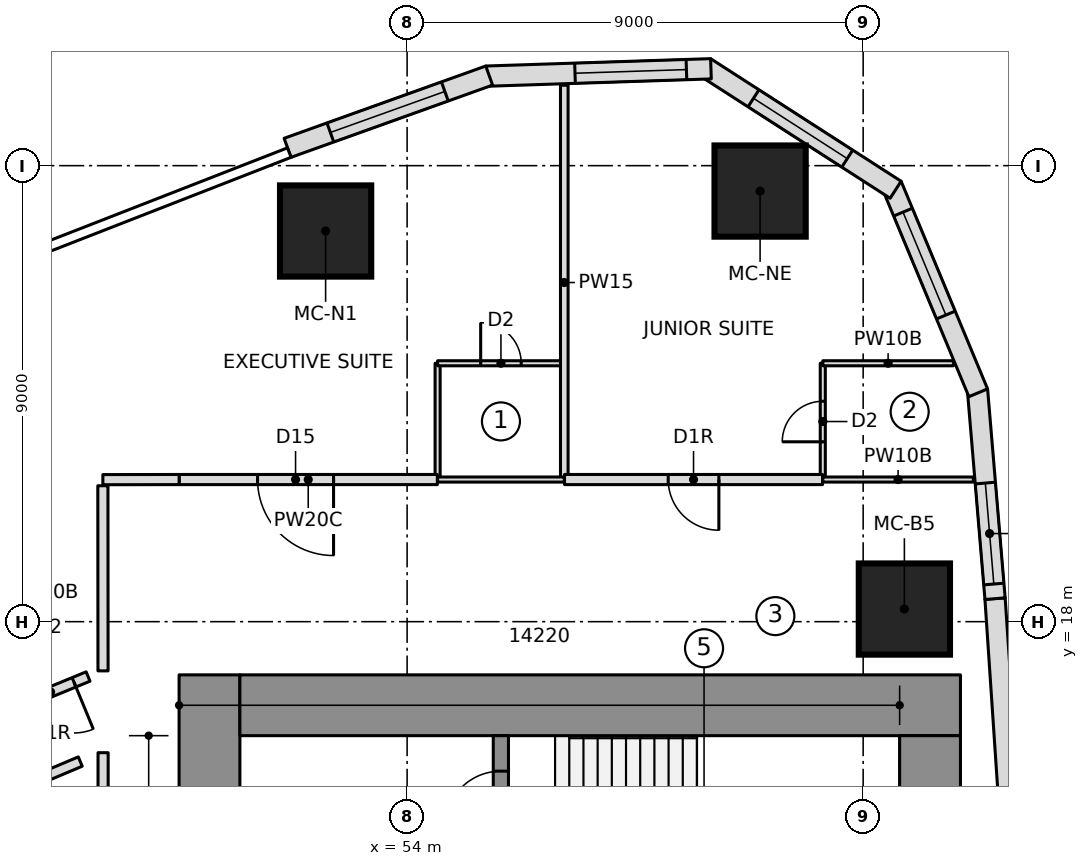
"""IFC4 building model, lengths in metres.
Left out: names, types, materials, properties, quantities, classifications, styles, units other than length and angle.
Written with IfcOpenShell. Run it as: python <this file> out.ifc"""

import sys

from ifc_helpers import new_model, si_unit, direction, frame, frame_2d, origin, origin_2d, place, context, subcontext, project, spatial, polyline, rectangle, outline, extrude, element, fill, save


model = new_model("IFC4")
c1 = context("Model", 3, precision=1e-05, world=origin(), true_north=direction((0.0, 1.0)))
c2 = subcontext(c1, "Body", "Model", "MODEL_VIEW")
j1 = project(units=[si_unit("LENGTHUNIT", "METRE"), si_unit("PLANEANGLEUNIT", "RADIAN")], contexts=[c1])
p1 = place(None, origin())
s1 = spatial("IfcSite", under=j1, at=p1, CompositionType="ELEMENT")
p2 = place(p1, origin())
s2 = spatial("IfcBuilding", under=s1, at=p2, CompositionType="ELEMENT")
p3 = place(p2, frame((0.0, 0.0, 64.45)))
s3 = spatial("IfcBuildingStorey", under=s2, at=p3, CompositionType="ELEMENT", Elevation=64.45)
p4 = place(p3, frame((50.1, 6.65, 0.0), z_axis=(0.0, 0.0, 1.0), x_axis=(0.0, 1.0, 0.0)))
e1 = element("IfcWall", 1, at=p4, inside=s3, PredefinedType="SHEAR", context=c2, shape_type="SweptSolid", body=[
    extrude(rectangle(XDim=10.3, YDim=1.2, at=frame_2d((5.15, 0.0))), origin(), (0.0, 0.0, 1.0), 3.55),
])
p5 = place(p4, frame((6.5, 0.0, 0.0)))
e2 = element("IfcOpeningElement", 2, at=p5, cuts=e1, PredefinedType="OPENING", context=c2, shape_type="SweptSolid", body=[
    extrude(rectangle(XDim=1.1, YDim=2.1, at=frame_2d((0.55, 1.05))), frame((0.0, 0.61, 0.0), z_axis=(0.0, -1.0, 0.0), x_axis=(1.0, 0.0, 0.0)), (0.0, 0.0, 1.0), 1.22),
])
p6 = place(p3, frame((50.7, 16.35, 0.0), z_axis=(0.0, 0.0, 1.0), x_axis=(1.0, 0.0, 0.0)))
e3 = element("IfcWall", 3, at=p6, inside=s3, PredefinedType="SHEAR", context=c2, shape_type="SweptSolid", body=[
    extrude(rectangle(XDim=14.22, YDim=1.2, at=frame_2d((7.11, 0.0))), origin(), (0.0, 0.0, 1.0), 3.55),
])
p7 = place(p3, frame((64.32, 9.95, 0.0), z_axis=(0.0, 0.0, 1.0), x_axis=(0.0, 1.0, 0.0)))
e4 = element("IfcWall", 4, at=p7, inside=s3, PredefinedType="SHEAR", context=c2, shape_type="SweptSolid", body=[
    extrude(rectangle(XDim=5.8, YDim=1.2, at=frame_2d((2.9, 0.0))), origin(), (0.0, 0.0, 1.0), 3.55),
])
p8 = place(p3, frame((55.85, 10.35, 0.0), z_axis=(0.0, 0.0, 1.0), x_axis=(0.0, 1.0, 0.0)))
e5 = element("IfcWall", 5, at=p8, inside=s3, PredefinedType="SHEAR", context=c2, shape_type="SweptSolid", body=[
    extrude(rectangle(XDim=5.4, YDim=0.3, at=frame_2d((2.7, 0.0))), origin(), (0.0, 0.0, 1.0), 3.55),
])
p9 = place(p8, frame((1.43, 0.0, 0.0)))
e6 = element("IfcOpeningElement", 6, at=p9, cuts=e5, PredefinedType="OPENING", context=c2, shape_type="SweptSolid", body=[
    extrude(rectangle(XDim=1.1, YDim=2.1, at=frame_2d((0.55, 1.05))), frame((0.0, 0.16, 0.0), z_axis=(0.0, -1.0, 0.0), x_axis=(1.0, 0.0, 0.0)), (0.0, 0.0, 1.0), 0.32),
])
p10 = place(p8, frame((3.6, 0.0, 0.0)))
e7 = element("IfcOpeningElement", 7, at=p10, cuts=e5, PredefinedType="OPENING", context=c2, shape_type="SweptSolid", body=[
    extrude(rectangle(XDim=1.1, YDim=2.1, at=frame_2d((0.55, 1.05))), frame((0.0, 0.16, 0.0), z_axis=(0.0, -1.0, 0.0), x_axis=(1.0, 0.0, 0.0)), (0.0, 0.0, 1.0), 0.32),
])
for number, where, z_axis, x_axis in (
    (8, (63.813, 18.249, 0.0), (0.0, 0.0, 1.0), (1.0, 0.0, 0.0)),
    (9, (60.966, 26.499, 0.0), (0.0, 0.0, 1.0), (1.0, 0.0, 0.0)),
    (10, (52.392, 25.71, 0.0), (0.0, 0.0, 1.0), (1.0, 0.0, 0.0)),
):
    element("IfcColumn", number, at=place(p3, frame(where, z_axis=z_axis, x_axis=x_axis)), inside=s3, PredefinedType="COLUMN", context=c2, shape_type="SweptSolid", body=[
        extrude(rectangle(XDim=1.8, YDim=1.8, at=origin_2d()), origin(), (0.0, 0.0, 1.0), 3.55),
    ])
p11 = place(p3, frame((65.878, 14.36, 0.0), z_axis=(0.0, 0.0, 1.0), x_axis=(-0.067087430225, 0.997747100575, 0.0)))
e11 = element("IfcWall", 11, at=p11, inside=s3, PredefinedType="NOTDEFINED", context=c2, shape_type="SweptSolid", body=[
    extrude(outline(polyline([(-0.002, -0.2), (4.107, -0.2), (4.103, 0.2), (0.002, 0.2), (-0.002, -0.2)])), origin(), (0.0, 0.0, 1.0), 3.25),
])
p12 = place(p3, frame((65.603, 18.455, 0.0), z_axis=(0.0, 0.0, 1.0), x_axis=(-0.083793550906, 0.996483136248, 0.0)))
e12 = element("IfcWall", 12, at=p12, inside=s3, PredefinedType="NOTDEFINED", context=c2, shape_type="SweptSolid", body=[
    extrude(outline(polyline([(-0.002, -0.2), (4.136, -0.2), (4.074, 0.2), (0.002, 0.2), (-0.002, -0.2)])), origin(), (0.0, 0.0, 1.0), 3.25),
])
p13 = place(p12, frame((0.288, 0.0, 0.5)))
e13 = element("IfcOpeningElement", 13, at=p13, cuts=e12, PredefinedType="OPENING", context=c2, shape_type="SweptSolid", body=[
    extrude(rectangle(XDim=2.0, YDim=2.0, at=frame_2d((1.0, 1.0))), frame((0.0, 0.21, 0.0), z_axis=(0.0, -1.0, 0.0), x_axis=(1.0, 0.0, 0.0)), (0.0, 0.0, 1.0), 0.42),
])
p14 = place(p3, frame((65.259, 22.546, 0.0), z_axis=(0.0, 0.0, 1.0), x_axis=(-0.384372042685, 0.923178277908, 0.0)))
e14 = element("IfcWall", 14, at=p14, inside=s3, PredefinedType="NOTDEFINED", context=c2, shape_type="SweptSolid", body=[
    extrude(outline(polyline([(-0.031, -0.2), (4.408, -0.2), (4.283, 0.2), (0.031, 0.2), (-0.031, -0.2)])), origin(), (0.0, 0.0, 1.0), 3.25),
])
p15 = place(p14, frame((1.631, 0.0, 0.6)))
e15 = element("IfcOpeningElement", 15, at=p15, cuts=e14, PredefinedType="OPENING", context=c2, shape_type="SweptSolid", body=[
    extrude(outline(polyline([(0.0, 1.35), (0.084, 1.771), (0.322, 2.128), (0.679, 2.366), (1.1, 2.45), (1.521, 2.366), (1.878, 2.128), (2.116, 1.771), (2.2, 1.35), (2.2, 1.1), (2.116, 0.679), (1.878, 0.322), (1.521, 0.084), (1.1, 0.0), (0.679, 0.084), (0.322, 0.322), (0.084, 0.679), (0.0, 1.1), (0.0, 1.35)])), frame((0.0, 0.21, 0.0), z_axis=(0.0, -1.0, 0.0), x_axis=(1.0, 0.0, 0.0)), (0.0, 0.0, 1.0), 0.42),
])
p16 = place(p3, frame((63.588, 26.558, 0.0), z_axis=(0.0, 0.0, 1.0), x_axis=(-0.840937468718, 0.541132307025, 0.0)))
e16 = element("IfcWall", 16, at=p16, inside=s3, PredefinedType="NOTDEFINED", context=c2, shape_type="SweptSolid", body=[
    extrude(outline(polyline([(-0.062, -0.2), (4.409, -0.2), (4.284, 0.2), (0.062, 0.2), (-0.062, -0.2)])), origin(), (0.0, 0.0, 1.0), 3.25),
])
p17 = place(p16, frame((1.073, 0.0, 0.6)))
e17 = element("IfcOpeningElement", 17, at=p17, cuts=e16, PredefinedType="OPENING", context=c2, shape_type="SweptSolid", body=[
    extrude(outline(polyline([(0.0, 1.35), (0.084, 1.771), (0.322, 2.128), (0.679, 2.366), (1.1, 2.45), (1.521, 2.366), (1.878, 2.128), (2.116, 1.771), (2.2, 1.35), (2.2, 1.1), (2.116, 0.679), (1.878, 0.322), (1.521, 0.084), (1.1, 0.0), (0.679, 0.084), (0.322, 0.322), (0.084, 0.679), (0.0, 1.1), (0.0, 1.35)])), frame((0.0, 0.21, 0.0), z_axis=(0.0, -1.0, 0.0), x_axis=(1.0, 0.0, 0.0)), (0.0, 0.0, 1.0), 0.42),
])
p18 = place(p3, frame((59.934, 28.91, 0.0), z_axis=(0.0, 0.0, 1.0), x_axis=(-0.999463576228, -0.032749958686, 0.0)))
e18 = element("IfcWall", 18, at=p18, inside=s3, PredefinedType="NOTDEFINED", context=c2, shape_type="SweptSolid", body=[
    extrude(outline(polyline([(-0.062, -0.2), (4.378, -0.2), (4.315, 0.2), (0.062, 0.2), (-0.062, -0.2)])), origin(), (0.0, 0.0, 1.0), 3.25),
])
p19 = place(p18, frame((0.422, 0.0, 0.6)))
e19 = element("IfcOpeningElement", 19, at=p19, cuts=e18, PredefinedType="OPENING", context=c2, shape_type="SweptSolid", body=[
    extrude(outline(polyline([(0.0, 1.35), (0.084, 1.771), (0.322, 2.128), (0.679, 2.366), (1.1, 2.45), (1.521, 2.366), (1.878, 2.128), (2.116, 1.771), (2.2, 1.35), (2.2, 1.1), (2.116, 0.679), (1.878, 0.322), (1.521, 0.084), (1.1, 0.0), (0.679, 0.084), (0.322, 0.322), (0.084, 0.679), (0.0, 1.1), (0.0, 1.35)])), frame((0.0, 0.21, 0.0), z_axis=(0.0, -1.0, 0.0), x_axis=(1.0, 0.0, 0.0)), (0.0, 0.0, 1.0), 0.42),
])
p20 = place(p3, frame((55.59, 28.768, 0.0), z_axis=(0.0, 0.0, 1.0), x_axis=(-0.941339752885, -0.337460323057, 0.0)))
e20 = element("IfcWall", 20, at=p20, inside=s3, PredefinedType="NOTDEFINED", context=c2, shape_type="SweptSolid", body=[
    extrude(outline(polyline([(-0.031, -0.2), (4.196, -0.2), (4.196, 0.2), (0.031, 0.2), (-0.031, -0.2)])), origin(), (0.0, 0.0, 1.0), 3.25),
])
p21 = place(p20, frame((0.898, 0.0, 0.5)))
e21 = element("IfcOpeningElement", 21, at=p21, cuts=e20, PredefinedType="OPENING", context=c2, shape_type="SweptSolid", body=[
    extrude(rectangle(XDim=2.4, YDim=2.0, at=frame_2d((1.2, 1.0))), frame((0.0, 0.21, 0.0), z_axis=(0.0, -1.0, 0.0), x_axis=(1.0, 0.0, 0.0)), (0.0, 0.0, 1.0), 0.42),
])
p22 = place(p3, frame((54.602, 20.8, 0.0), z_axis=(0.0, 0.0, 1.0), x_axis=(0.0, 1.0, 0.0)))
e22 = element("IfcWall", 22, at=p22, inside=s3, PredefinedType="PARTITIONING", context=c2, shape_type="SweptSolid", body=[
    extrude(rectangle(XDim=2.3, YDim=0.1, at=frame_2d((1.15, 0.0))), origin(), (0.0, 0.0, 1.0), 3.25),
])
p23 = place(p3, frame((54.602, 23.1, 0.0), z_axis=(0.0, 0.0, 1.0), x_axis=(1.0, 0.0, 0.0)))
e23 = element("IfcWall", 23, at=p23, inside=s3, PredefinedType="PARTITIONING", context=c2, shape_type="SweptSolid", body=[
    extrude(rectangle(XDim=2.5, YDim=0.1, at=frame_2d((1.25, 0.0))), origin(), (0.0, 0.0, 1.0), 3.25),
])
p24 = place(p23, frame((0.85, 0.0, 0.0)))
e24 = element("IfcOpeningElement", 24, at=p24, cuts=e23, PredefinedType="OPENING", context=c2, shape_type="SweptSolid", body=[
    extrude(rectangle(XDim=0.8, YDim=2.1, at=frame_2d((0.4, 1.05))), frame((0.0, 0.06, 0.0), z_axis=(0.0, -1.0, 0.0), x_axis=(1.0, 0.0, 0.0)), (0.0, 0.0, 1.0), 0.12),
])
p25 = place(p3, frame((62.203, 20.8, 0.0), z_axis=(0.0, 0.0, 1.0), x_axis=(0.0, 1.0, 0.0)))
e25 = element("IfcWall", 25, at=p25, inside=s3, PredefinedType="PARTITIONING", context=c2, shape_type="SweptSolid", body=[
    extrude(rectangle(XDim=2.3, YDim=0.1, at=frame_2d((1.15, 0.0))), origin(), (0.0, 0.0, 1.0), 3.25),
])
p26 = place(p25, frame((0.75, 0.0, 0.0)))
e26 = element("IfcOpeningElement", 26, at=p26, cuts=e25, PredefinedType="OPENING", context=c2, shape_type="SweptSolid", body=[
    extrude(rectangle(XDim=0.8, YDim=2.1, at=frame_2d((0.4, 1.05))), frame((0.0, 0.06, 0.0), z_axis=(0.0, -1.0, 0.0), x_axis=(1.0, 0.0, 0.0)), (0.0, 0.0, 1.0), 0.12),
])
p27 = place(p3, frame((62.203, 23.1, 0.0), z_axis=(0.0, 0.0, 1.0), x_axis=(1.0, 0.0, 0.0)))
e27 = element("IfcWall", 27, at=p27, inside=s3, PredefinedType="PARTITIONING", context=c2, shape_type="SweptSolid", body=[
    extrude(rectangle(XDim=2.578, YDim=0.1, at=frame_2d((1.289, 0.0))), origin(), (0.0, 0.0, 1.0), 3.25),
])
p28 = place(p3, frame((57.102, 20.8, 0.0), z_axis=(0.0, 0.0, 1.0), x_axis=(0.0, 1.0, 0.0)))
e28 = element("IfcWall", 28, at=p28, inside=s3, PredefinedType="PARTITIONING", context=c2, shape_type="SweptSolid", body=[
    extrude(rectangle(XDim=7.787, YDim=0.15, at=frame_2d((3.894, 0.0))), origin(), (0.0, 0.0, 1.0), 3.25),
])
p29 = place(p3, frame((43.85, 13.677, 0.0), z_axis=(0.0, 0.0, 1.0), x_axis=(0.921269894054, 0.388923877269, 0.0)))
e29 = element("IfcWall", 29, at=p29, inside=s3, PredefinedType="PARTITIONING", context=c2, shape_type="SweptSolid", body=[
    extrude(rectangle(XDim=4.016, YDim=0.2, at=frame_2d((2.008, 0.0))), origin(), (0.0, 0.0, 1.0), 3.25),
])
p30 = place(p3, frame((54.597, 20.805, 0.0), z_axis=(0.0, 0.0, 1.0), x_axis=(-1.0, 0.0, 0.0)))
e30 = element("IfcWall", 30, at=p30, inside=s3, PredefinedType="PARTITIONING", context=c2, shape_type="SweptSolid", body=[
    extrude(rectangle(XDim=5.097, YDim=0.2, at=frame_2d((2.548, 0.0))), origin(), (0.0, 0.0, 1.0), 3.25),
])
p31 = place(p30, frame((2.048, 0.0, 0.0)))
e31 = element("IfcOpeningElement", 31, at=p31, cuts=e30, PredefinedType="OPENING", context=c2, shape_type="SweptSolid", body=[
    extrude(rectangle(XDim=1.5, YDim=2.1, at=frame_2d((0.75, 1.05))), frame((0.0, 0.11, 0.0), z_axis=(0.0, -1.0, 0.0), x_axis=(1.0, 0.0, 0.0)), (0.0, 0.0, 1.0), 0.22),
])
p32 = place(p3, frame((62.198, 20.805, 0.0), z_axis=(0.0, 0.0, 1.0), x_axis=(-1.0, 0.0, 0.0)))
e32 = element("IfcWall", 32, at=p32, inside=s3, PredefinedType="PARTITIONING", context=c2, shape_type="SweptSolid", body=[
    extrude(rectangle(XDim=5.092, YDim=0.2, at=frame_2d((2.546, 0.0))), origin(), (0.0, 0.0, 1.0), 3.25),
])
p33 = place(p32, frame((2.046, 0.0, 0.0)))
e33 = element("IfcOpeningElement", 33, at=p33, cuts=e32, PredefinedType="OPENING", context=c2, shape_type="SweptSolid", body=[
    extrude(rectangle(XDim=1.0, YDim=2.1, at=frame_2d((0.5, 1.05))), frame((0.0, 0.11, 0.0), z_axis=(0.0, -1.0, 0.0), x_axis=(1.0, 0.0, 0.0)), (0.0, 0.0, 1.0), 0.22),
])
p34 = place(p3, frame((57.102, 20.805, 0.0), z_axis=(0.0, 0.0, 1.0), x_axis=(-1.0, 0.0, 0.0)))
e34 = element("IfcWall", 34, at=p34, inside=s3, PredefinedType="PARTITIONING", context=c2, shape_type="SweptSolid", body=[
    extrude(rectangle(XDim=2.5, YDim=0.1, at=frame_2d((1.25, 0.0))), origin(), (0.0, 0.0, 1.0), 3.25),
])
p35 = place(p3, frame((65.175, 20.805, 0.0), z_axis=(0.0, 0.0, 1.0), x_axis=(-1.0, 0.0, 0.0)))
e35 = element("IfcWall", 35, at=p35, inside=s3, PredefinedType="PARTITIONING", context=c2, shape_type="SweptSolid", body=[
    extrude(rectangle(XDim=2.971, YDim=0.1, at=frame_2d((1.486, 0.0))), origin(), (0.0, 0.0, 1.0), 3.25),
])
p36 = place(p3, frame((47.704, 16.917, 0.0), z_axis=(0.0, 0.0, 1.0), x_axis=(-0.924573816857, -0.381002962169, 0.0)))
e36 = element("IfcWall", 36, at=p36, inside=s3, PredefinedType="PARTITIONING", context=c2, shape_type="SweptSolid", body=[
    extrude(rectangle(XDim=3.929, YDim=0.2, at=frame_2d((1.964, 0.0))), origin(), (0.0, 0.0, 1.0), 3.25),
])
p37 = place(p36, frame((0.3, 0.0, 0.0)))
e37 = element("IfcOpeningElement", 37, at=p37, cuts=e36, PredefinedType="OPENING", context=c2, shape_type="SweptSolid", body=[
    extrude(rectangle(XDim=1.0, YDim=2.1, at=frame_2d((0.5, 1.05))), frame((0.0, 0.11, 0.0), z_axis=(0.0, -1.0, 0.0), x_axis=(1.0, 0.0, 0.0)), (0.0, 0.0, 1.0), 0.22),
])
p38 = place(p3, frame((48.0, 15.414, 0.0), z_axis=(0.0, 0.0, 1.0), x_axis=(0.0, -1.0, 0.0)))
e38 = element("IfcWall", 38, at=p38, inside=s3, PredefinedType="PARTITIONING", context=c2, shape_type="SweptSolid", body=[
    extrude(rectangle(XDim=30.828, YDim=0.2, at=frame_2d((15.414, 0.0))), origin(), (0.0, 0.0, 1.0), 3.25),
])
p39 = place(p3, frame((49.5, 20.805, 0.0), z_axis=(0.0, 0.0, 1.0), x_axis=(-0.999998933031, -0.001460800259, 0.0)))
e39 = element("IfcWall", 39, at=p39, inside=s3, PredefinedType="PARTITIONING", context=c2, shape_type="SweptSolid", body=[
    extrude(rectangle(XDim=1.504, YDim=0.2, at=frame_2d((0.752, 0.0))), origin(), (0.0, 0.0, 1.0), 3.25),
])
p40 = place(p3, frame((47.996, 20.683, 0.0), z_axis=(0.0, 0.0, 1.0), x_axis=(0.000801763623, -0.999999678587, 0.0)))
e40 = element("IfcWall", 40, at=p40, inside=s3, PredefinedType="PARTITIONING", context=c2, shape_type="SweptSolid", body=[
    extrude(rectangle(XDim=3.654, YDim=0.2, at=frame_2d((1.827, 0.0))), origin(), (0.0, 0.0, 1.0), 3.25),
])
p41 = place(p13, origin())
e41 = element("IfcWindow", 41, at=p41, inside=s3, PartitioningType="SINGLE_PANEL", PredefinedType="WINDOW", context=c2, shape_type="SweptSolid", body=[
    extrude(rectangle(XDim=2.0, YDim=2.0, at=frame_2d((1.0, 1.0))), frame((0.0, 0.17, 0.0), z_axis=(0.0, -1.0, 0.0), x_axis=(1.0, 0.0, 0.0)), (0.0, 0.0, 1.0), 0.06),
])
fill(e13, e41)
p42 = place(p15, origin())
e42 = element("IfcWindow", 42, at=p42, inside=s3, PartitioningType="SINGLE_PANEL", PredefinedType="WINDOW", context=c2, shape_type="SweptSolid", body=[
    extrude(outline(polyline([(0.0, 1.35), (0.084, 1.771), (0.322, 2.128), (0.679, 2.366), (1.1, 2.45), (1.521, 2.366), (1.878, 2.128), (2.116, 1.771), (2.2, 1.35), (2.2, 1.1), (2.116, 0.679), (1.878, 0.322), (1.521, 0.084), (1.1, 0.0), (0.679, 0.084), (0.322, 0.322), (0.084, 0.679), (0.0, 1.1), (0.0, 1.35)])), frame((0.0, 0.17, 0.0), z_axis=(0.0, -1.0, 0.0), x_axis=(1.0, 0.0, 0.0)), (0.0, 0.0, 1.0), 0.06),
])
fill(e15, e42)
p43 = place(p17, origin())
e43 = element("IfcWindow", 43, at=p43, inside=s3, PartitioningType="SINGLE_PANEL", PredefinedType="WINDOW", context=c2, shape_type="SweptSolid", body=[
    extrude(outline(polyline([(0.0, 1.35), (0.084, 1.771), (0.322, 2.128), (0.679, 2.366), (1.1, 2.45), (1.521, 2.366), (1.878, 2.128), (2.116, 1.771), (2.2, 1.35), (2.2, 1.1), (2.116, 0.679), (1.878, 0.322), (1.521, 0.084), (1.1, 0.0), (0.679, 0.084), (0.322, 0.322), (0.084, 0.679), (0.0, 1.1), (0.0, 1.35)])), frame((0.0, 0.17, 0.0), z_axis=(0.0, -1.0, 0.0), x_axis=(1.0, 0.0, 0.0)), (0.0, 0.0, 1.0), 0.06),
])
fill(e17, e43)
p44 = place(p19, origin())
e44 = element("IfcWindow", 44, at=p44, inside=s3, PartitioningType="SINGLE_PANEL", PredefinedType="WINDOW", context=c2, shape_type="SweptSolid", body=[
    extrude(outline(polyline([(0.0, 1.35), (0.084, 1.771), (0.322, 2.128), (0.679, 2.366), (1.1, 2.45), (1.521, 2.366), (1.878, 2.128), (2.116, 1.771), (2.2, 1.35), (2.2, 1.1), (2.116, 0.679), (1.878, 0.322), (1.521, 0.084), (1.1, 0.0), (0.679, 0.084), (0.322, 0.322), (0.084, 0.679), (0.0, 1.1), (0.0, 1.35)])), frame((0.0, 0.17, 0.0), z_axis=(0.0, -1.0, 0.0), x_axis=(1.0, 0.0, 0.0)), (0.0, 0.0, 1.0), 0.06),
])
fill(e19, e44)
p45 = place(p21, origin())
e45 = element("IfcWindow", 45, at=p45, inside=s3, PartitioningType="SINGLE_PANEL", PredefinedType="WINDOW", context=c2, shape_type="SweptSolid", body=[
    extrude(rectangle(XDim=2.4, YDim=2.0, at=frame_2d((1.2, 1.0))), frame((0.0, 0.17, 0.0), z_axis=(0.0, -1.0, 0.0), x_axis=(1.0, 0.0, 0.0)), (0.0, 0.0, 1.0), 0.06),
])
fill(e21, e45)
p46 = place(p24, origin())
e46 = element("IfcDoor", 46, at=p46, inside=s3, OperationType="SINGLE_SWING_LEFT", PredefinedType="DOOR", context=c2, shape_type="SweptSolid", body=[
    extrude(rectangle(XDim=0.8, YDim=2.1, at=frame_2d((0.4, 1.05))), frame((0.0, 0.025, 0.0), z_axis=(0.0, -1.0, 0.0), x_axis=(1.0, 0.0, 0.0)), (0.0, 0.0, 1.0), 0.05),
])
fill(e24, e46)
p47 = place(p26, origin())
e47 = element("IfcDoor", 47, at=p47, inside=s3, OperationType="SINGLE_SWING_LEFT", PredefinedType="DOOR", context=c2, shape_type="SweptSolid", body=[
    extrude(rectangle(XDim=0.8, YDim=2.1, at=frame_2d((0.4, 1.05))), frame((0.0, 0.025, 0.0), z_axis=(0.0, -1.0, 0.0), x_axis=(1.0, 0.0, 0.0)), (0.0, 0.0, 1.0), 0.05),
])
fill(e26, e47)
p48 = place(p37, origin())
e48 = element("IfcDoor", 48, at=p48, inside=s3, OperationType="SINGLE_SWING_RIGHT", PredefinedType="DOOR", context=c2, shape_type="SweptSolid", body=[
    extrude(rectangle(XDim=1.0, YDim=2.1, at=frame_2d((0.5, 1.05))), frame((0.0, 0.025, 0.0), z_axis=(0.0, -1.0, 0.0), x_axis=(1.0, 0.0, 0.0)), (0.0, 0.0, 1.0), 0.05),
])
fill(e37, e48)
p49 = place(p31, origin())
e49 = element("IfcDoor", 49, at=p49, inside=s3, OperationType="DOUBLE_DOOR_SINGLE_SWING", PredefinedType="DOOR", context=c2, shape_type="SweptSolid", body=[
    extrude(rectangle(XDim=1.5, YDim=2.1, at=frame_2d((0.75, 1.05))), frame((0.0, 0.025, 0.0), z_axis=(0.0, -1.0, 0.0), x_axis=(1.0, 0.0, 0.0)), (0.0, 0.0, 1.0), 0.05),
])
fill(e31, e49)
p50 = place(p33, origin())
e50 = element("IfcDoor", 50, at=p50, inside=s3, OperationType="SINGLE_SWING_RIGHT", PredefinedType="DOOR", context=c2, shape_type="SweptSolid", body=[
    extrude(rectangle(XDim=1.0, YDim=2.1, at=frame_2d((0.5, 1.05))), frame((0.0, 0.025, 0.0), z_axis=(0.0, -1.0, 0.0), x_axis=(1.0, 0.0, 0.0)), (0.0, 0.0, 1.0), 0.05),
])
fill(e33, e50)
p51 = place(p10, origin())
e51 = element("IfcDoor", 51, at=p51, inside=s3, OperationType="SINGLE_SWING_RIGHT", PredefinedType="DOOR", context=c2, shape_type="SweptSolid", body=[
    extrude(rectangle(XDim=1.1, YDim=2.1, at=frame_2d((0.55, 1.05))), frame((0.0, 0.025, 0.0), z_axis=(0.0, -1.0, 0.0), x_axis=(1.0, 0.0, 0.0)), (0.0, 0.0, 1.0), 0.05),
])
fill(e7, e51)
save(model, sys.argv[1])
